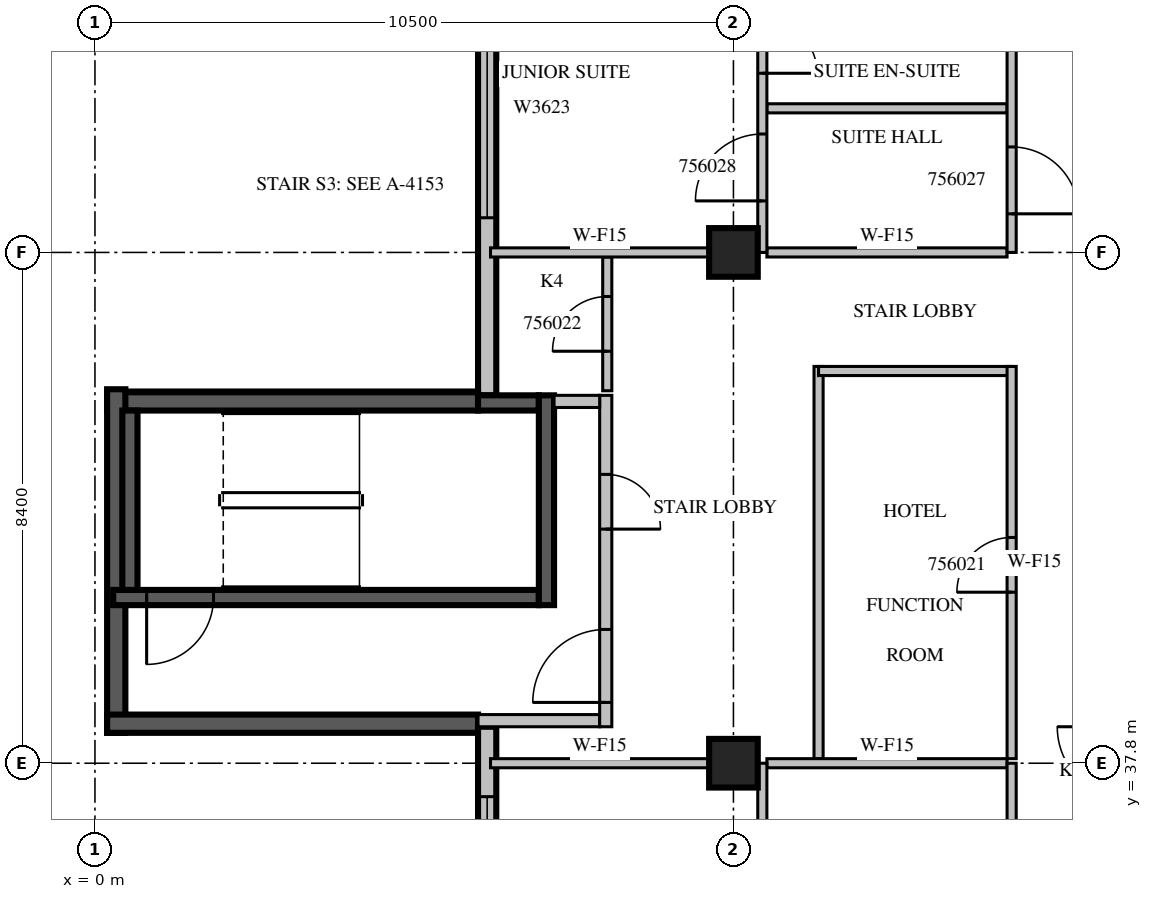
"""IFC4 building model, lengths in metres.
Left out: names, types, materials, properties, quantities, classifications, styles, units other than length and angle.
Written with IfcOpenShell. Run it as: python <this file> out.ifc"""

import sys

from ifc_helpers import new_model, si_unit, direction, frame, frame_2d, origin, origin_2d, place, context, subcontext, project, spatial, rectangle, extrude, source, transform, mapped, element, fill, save


model = new_model("IFC4")
c1 = context("Model", 3, precision=1e-05, world=origin(), true_north=direction((0.0, 1.0)))
c2 = subcontext(c1, "Body", "Model", "MODEL_VIEW")
j1 = project(units=[si_unit("LENGTHUNIT", "METRE"), si_unit("PLANEANGLEUNIT", "RADIAN")], contexts=[c1])
p1 = place(None, origin())
s1 = spatial("IfcSite", under=j1, at=p1, CompositionType="ELEMENT")
p2 = place(p1, origin())
s2 = spatial("IfcBuilding", under=s1, at=p2, CompositionType="ELEMENT")
p3 = place(p2, frame((0.0, 0.0, 246.2)))
s3 = spatial("IfcBuildingStorey", under=s2, at=p3, CompositionType="ELEMENT", Elevation=246.2)
m1 = source(origin(), c2, "Body", "SweptSolid", [
    extrude(rectangle(XDim=0.8, YDim=0.8, at=origin_2d()), origin(), (0.0, 0.0, 1.0), 3.8),
])
for number, where, z_axis, x_axis in (
    (1, (10.5, 37.8, 0.0), (0.0, 0.0, 1.0), (1.0, 0.0, 0.0)),
    (2, (10.5, 46.2, 0.0), (0.0, 0.0, 1.0), (1.0, 0.0, 0.0)),
):
    element("IfcColumn", number, at=place(p3, frame(where, z_axis=z_axis, x_axis=x_axis)), inside=s3, PredefinedType="COLUMN", context=c2, shape_type="MappedRepresentation", body=[
        mapped(m1, transform((0.0, 0.0, 0.0), scale=1.0)),
    ])
m2 = source(origin(), c2, "Body", "SweptSolid", [
    extrude(rectangle(XDim=9.91, YDim=0.3, at=frame_2d((4.955, 0.0))), origin(), (0.0, 0.0, 1.0), 3.4),
])
p4 = place(p3, frame((6.45, 53.76, 0.0), z_axis=(0.0, 0.0, 1.0), x_axis=(0.0, -1.0, 0.0)))
e3 = element("IfcWall", 3, at=p4, inside=s3, PredefinedType="STANDARD", context=c2, shape_type="MappedRepresentation", body=[
    mapped(m2, transform((0.0, 0.0, 0.0), scale=1.0)),
])
m3 = source(origin(), c2, "Body", "SweptSolid", [
    extrude(rectangle(XDim=3.6, YDim=2.3, at=frame_2d((1.8, 1.15))), frame((0.0, 0.16, 0.0), z_axis=(0.0, -1.0, 0.0), x_axis=(1.0, 0.0, 0.0)), (0.0, 0.0, 1.0), 0.32),
])
p5 = place(p4, frame((3.39, 0.0, 0.6)))
e4 = element("IfcOpeningElement", 4, at=p5, cuts=e3, PredefinedType="OPENING", context=c2, shape_type="MappedRepresentation", body=[
    mapped(m3, transform((0.0, 0.0, 0.0), scale=1.0)),
])
m4 = source(origin(), c2, "Body", "SweptSolid", [
    extrude(rectangle(XDim=2.4, YDim=2.3, at=frame_2d((1.2, 1.15))), frame((0.0, 0.16, 0.0), z_axis=(0.0, -1.0, 0.0), x_axis=(1.0, 0.0, 0.0)), (0.0, 0.0, 1.0), 0.32),
])
p6 = place(p4, frame((0.495, 0.0, 0.6)))
e5 = element("IfcOpeningElement", 5, at=p6, cuts=e3, PredefinedType="OPENING", context=c2, shape_type="MappedRepresentation", body=[
    mapped(m4, transform((0.0, 0.0, 0.0), scale=1.0)),
])
m5 = source(origin(), c2, "Body", "SweptSolid", [
    extrude(rectangle(XDim=6.1, YDim=0.3, at=frame_2d((3.05, 0.0))), origin(), (0.0, 0.0, 1.0), 3.4),
])
p7 = place(p3, frame((6.3, 43.75, 0.0), z_axis=(0.0, 0.0, 1.0), x_axis=(-1.0, 0.0, 0.0)))
e6 = element("IfcWall", 6, at=p7, inside=s3, PredefinedType="SOLIDWALL", context=c2, shape_type="MappedRepresentation", body=[
    mapped(m5, transform((0.0, 0.0, 0.0), scale=1.0)),
])
m6 = source(origin(), c2, "Body", "SweptSolid", [
    extrude(rectangle(XDim=5.65, YDim=0.3, at=frame_2d((2.825, 0.0))), origin(), (0.0, 0.0, 1.0), 3.4),
])
p8 = place(p3, frame((0.35, 43.95, 0.0), z_axis=(0.0, 0.0, 1.0), x_axis=(0.0, -1.0, 0.0)))
e7 = element("IfcWall", 7, at=p8, inside=s3, PredefinedType="SOLIDWALL", context=c2, shape_type="MappedRepresentation", body=[
    mapped(m6, transform((0.0, 0.0, 0.0), scale=1.0)),
])
p9 = place(p3, frame((0.2, 38.45, 0.0), z_axis=(0.0, 0.0, 1.0), x_axis=(1.0, 0.0, 0.0)))
e8 = element("IfcWall", 8, at=p9, inside=s3, PredefinedType="SOLIDWALL", context=c2, shape_type="MappedRepresentation", body=[
    mapped(m5, transform((0.0, 0.0, 0.0), scale=1.0)),
])
m7 = source(origin(), c2, "Body", "SweptSolid", [
    extrude(rectangle(XDim=16.6, YDim=0.3, at=frame_2d((8.3, 0.0))), origin(), (0.0, 0.0, 1.0), 3.4),
])
p10 = place(p3, frame((6.45, 38.4, 0.0), z_axis=(0.0, 0.0, 1.0), x_axis=(0.0, -1.0, 0.0)))
e9 = element("IfcWall", 9, at=p10, inside=s3, PredefinedType="STANDARD", context=c2, shape_type="MappedRepresentation", body=[
    mapped(m7, transform((0.0, 0.0, 0.0), scale=1.0)),
])
m8 = source(origin(), c2, "Body", "SweptSolid", [
    extrude(rectangle(XDim=1.8, YDim=2.3, at=frame_2d((0.9, 1.15))), frame((0.0, 0.16, 0.0), z_axis=(0.0, -1.0, 0.0), x_axis=(1.0, 0.0, 0.0)), (0.0, 0.0, 1.0), 0.32),
])
p11 = place(p10, frame((1.15, 0.0, 0.6)))
e10 = element("IfcOpeningElement", 10, at=p11, cuts=e9, PredefinedType="OPENING", context=c2, shape_type="MappedRepresentation", body=[
    mapped(m8, transform((0.0, 0.0, 0.0), scale=1.0)),
])
p12 = place(p10, frame((9.438, 0.0, 0.6)))
e11 = element("IfcOpeningElement", 11, at=p12, cuts=e9, PredefinedType="OPENING", context=c2, shape_type="MappedRepresentation", body=[
    mapped(m8, transform((0.0, 0.0, 0.0), scale=1.0)),
])
m9 = source(origin(), c2, "Body", "SweptSolid", [
    extrude(rectangle(XDim=3.0, YDim=2.3, at=frame_2d((1.5, 1.15))), frame((0.0, 0.16, 0.0), z_axis=(0.0, -1.0, 0.0), x_axis=(1.0, 0.0, 0.0)), (0.0, 0.0, 1.0), 0.32),
])
p13 = place(p10, frame((12.7, 0.0, 0.6)))
e12 = element("IfcOpeningElement", 12, at=p13, cuts=e9, PredefinedType="OPENING", context=c2, shape_type="MappedRepresentation", body=[
    mapped(m9, transform((0.0, 0.0, 0.0), scale=1.0)),
])
m10 = source(origin(), c2, "Body", "SweptSolid", [
    extrude(rectangle(XDim=1.0, YDim=2.1, at=frame_2d((0.5, 1.05))), frame((0.0, 0.16, 0.0), z_axis=(0.0, -1.0, 0.0), x_axis=(1.0, 0.0, 0.0)), (0.0, 0.0, 1.0), 0.32),
])
p14 = place(p10, frame((5.45, 0.0, 0.0)))
e13 = element("IfcOpeningElement", 13, at=p14, cuts=e9, PredefinedType="OPENING", context=c2, shape_type="MappedRepresentation", body=[
    mapped(m10, transform((0.0, 0.0, 0.0), scale=1.0)),
])
m11 = source(origin(), c2, "Body", "SweptSolid", [
    extrude(rectangle(XDim=7.0, YDim=0.25, at=frame_2d((3.5, 0.0))), origin(), (0.0, 0.0, 1.0), 3.4),
])
p15 = place(p3, frame((0.3, 40.525, 0.0), z_axis=(0.0, 0.0, 1.0), x_axis=(1.0, 0.0, 0.0)))
e14 = element("IfcWall", 14, at=p15, inside=s3, PredefinedType="SOLIDWALL", context=c2, shape_type="MappedRepresentation", body=[
    mapped(m11, transform((0.0, 0.0, 0.0), scale=1.0)),
])
m12 = source(origin(), c2, "Body", "SweptSolid", [
    extrude(rectangle(XDim=1.1, YDim=2.1, at=frame_2d((0.55, 1.05))), frame((0.0, 0.135, 0.0), z_axis=(0.0, -1.0, 0.0), x_axis=(1.0, 0.0, 0.0)), (0.0, 0.0, 1.0), 0.27),
])
p16 = place(p15, frame((0.55, 0.0, 0.0)))
e15 = element("IfcOpeningElement", 15, at=p16, cuts=e14, PredefinedType="OPENING", context=c2, shape_type="MappedRepresentation", body=[
    mapped(m12, transform((0.0, 0.0, 0.0), scale=1.0)),
])
m13 = source(origin(), c2, "Body", "SweptSolid", [
    extrude(rectangle(XDim=1.0, YDim=0.25, at=frame_2d((0.5, 0.0))), origin(), (0.0, 0.0, 1.0), 3.4),
])
p17 = place(p3, frame((6.3, 43.725, 0.0), z_axis=(0.0, 0.0, 1.0), x_axis=(1.0, 0.0, 0.0)))
e16 = element("IfcWall", 16, at=p17, inside=s3, PredefinedType="SOLIDWALL", context=c2, shape_type="MappedRepresentation", body=[
    mapped(m13, transform((0.0, 0.0, 0.0), scale=1.0)),
])
m14 = source(origin(), c2, "Body", "SweptSolid", [
    extrude(rectangle(XDim=3.45, YDim=0.25, at=frame_2d((1.725, 0.0))), origin(), (0.0, 0.0, 1.0), 3.4),
])
p18 = place(p3, frame((7.425, 40.4, 0.0), z_axis=(0.0, 0.0, 1.0), x_axis=(0.0, 1.0, 0.0)))
e17 = element("IfcWall", 17, at=p18, inside=s3, PredefinedType="SOLIDWALL", context=c2, shape_type="MappedRepresentation", body=[
    mapped(m14, transform((0.0, 0.0, 0.0), scale=1.0)),
])
m15 = source(origin(), c2, "Body", "SweptSolid", [
    extrude(rectangle(XDim=2.95, YDim=0.25, at=frame_2d((1.475, 0.0))), origin(), (0.0, 0.0, 1.0), 3.4),
])
p19 = place(p3, frame((0.575, 40.65, 0.0), z_axis=(0.0, 0.0, 1.0), x_axis=(0.0, 1.0, 0.0)))
e18 = element("IfcWall", 18, at=p19, inside=s3, PredefinedType="SOLIDWALL", context=c2, shape_type="MappedRepresentation", body=[
    mapped(m15, transform((0.0, 0.0, 0.0), scale=1.0)),
])
m16 = source(origin(), c2, "Body", "SweptSolid", [
    extrude(rectangle(XDim=2.0, YDim=0.2, at=frame_2d((1.0, 0.0))), origin(), (0.0, 0.0, 1.0), 3.4),
])
p20 = place(p3, frame((6.3, 38.5, 0.0), z_axis=(0.0, 0.0, 1.0), x_axis=(1.0, 0.0, 0.0)))
e19 = element("IfcWall", 19, at=p20, inside=s3, PredefinedType="PARTITIONING", context=c2, shape_type="MappedRepresentation", body=[
    mapped(m16, transform((0.0, 0.0, 0.0), scale=1.0)),
])
m17 = source(origin(), c2, "Body", "SweptSolid", [
    extrude(rectangle(XDim=5.45, YDim=0.2, at=frame_2d((2.725, 0.0))), origin(), (0.0, 0.0, 1.0), 3.4),
])
p21 = place(p3, frame((8.4, 38.4, 0.0), z_axis=(0.0, 0.0, 1.0), x_axis=(0.0, 1.0, 0.0)))
e20 = element("IfcWall", 20, at=p21, inside=s3, PredefinedType="PARTITIONING", context=c2, shape_type="MappedRepresentation", body=[
    mapped(m17, transform((0.0, 0.0, 0.0), scale=1.0)),
])
m18 = source(origin(), c2, "Body", "SweptSolid", [
    extrude(rectangle(XDim=1.2, YDim=2.1, at=frame_2d((0.6, 1.05))), frame((0.0, 0.11, 0.0), z_axis=(0.0, -1.0, 0.0), x_axis=(1.0, 0.0, 0.0)), (0.0, 0.0, 1.0), 0.22),
])
p22 = place(p21, frame((0.4, 0.0, 0.0)))
e21 = element("IfcOpeningElement", 21, at=p22, cuts=e20, PredefinedType="OPENING", context=c2, shape_type="MappedRepresentation", body=[
    mapped(m18, transform((0.0, 0.0, 0.0), scale=1.0)),
])
m19 = source(origin(), c2, "Body", "SweptSolid", [
    extrude(rectangle(XDim=0.9, YDim=2.1, at=frame_2d((0.45, 1.05))), frame((0.0, 0.11, 0.0), z_axis=(0.0, -1.0, 0.0), x_axis=(1.0, 0.0, 0.0)), (0.0, 0.0, 1.0), 0.22),
])
p23 = place(p21, frame((3.25, 0.0, 0.0)))
e22 = element("IfcOpeningElement", 22, at=p23, cuts=e20, PredefinedType="OPENING", context=c2, shape_type="MappedRepresentation", body=[
    mapped(m19, transform((0.0, 0.0, 0.0), scale=1.0)),
])
m20 = source(origin(), c2, "Body", "SweptSolid", [
    extrude(rectangle(XDim=0.75, YDim=0.2, at=frame_2d((0.375, 0.0))), origin(), (0.0, 0.0, 1.0), 3.4),
])
p24 = place(p3, frame((7.55, 43.75, 0.0), z_axis=(0.0, 0.0, 1.0), x_axis=(1.0, 0.0, 0.0)))
e23 = element("IfcWall", 23, at=p24, inside=s3, PredefinedType="PARTITIONING", context=c2, shape_type="MappedRepresentation", body=[
    mapped(m20, transform((0.0, 0.0, 0.0), scale=1.0)),
])
m21 = source(origin(), c2, "Body", "SweptSolid", [
    extrude(rectangle(XDim=6.45, YDim=0.15, at=frame_2d((3.225, 0.0))), origin(), (0.0, 0.0, 1.0), 3.4),
])
p25 = place(p3, frame((11.9, 44.325, 0.0), z_axis=(0.0, 0.0, 1.0), x_axis=(0.0, -1.0, 0.0)))
e24 = element("IfcWall", 24, at=p25, inside=s3, PredefinedType="PARTITIONING", context=c2, shape_type="MappedRepresentation", body=[
    mapped(m21, transform((0.0, 0.0, 0.0), scale=1.0)),
])
m22 = source(origin(), c2, "Body", "SweptSolid", [
    extrude(rectangle(XDim=3.175, YDim=0.15, at=frame_2d((1.587, 0.0))), origin(), (0.0, 0.0, 1.0), 3.4),
])
p26 = place(p3, frame((15.075, 44.25, 0.0), z_axis=(0.0, 0.0, 1.0), x_axis=(-1.0, 0.0, 0.0)))
e25 = element("IfcWall", 25, at=p26, inside=s3, PredefinedType="PARTITIONING", context=c2, shape_type="MappedRepresentation", body=[
    mapped(m22, transform((0.0, 0.0, 0.0), scale=1.0)),
])
p27 = place(p3, frame((15.075, 37.875, 0.0), z_axis=(0.0, 0.0, 1.0), x_axis=(0.0, 1.0, 0.0)))
e26 = element("IfcWall", 26, at=p27, inside=s3, PredefinedType="PARTITIONING", context=c2, shape_type="MappedRepresentation", body=[
    mapped(m21, transform((0.0, 0.0, 0.0), scale=1.0)),
])
m23 = source(origin(), c2, "Body", "SweptSolid", [
    extrude(rectangle(XDim=0.9, YDim=2.1, at=frame_2d((0.45, 1.05))), frame((0.0, 0.085, 0.0), z_axis=(0.0, -1.0, 0.0), x_axis=(1.0, 0.0, 0.0)), (0.0, 0.0, 1.0), 0.17),
])
p28 = place(p27, frame((2.737, 0.0, 0.0)))
e27 = element("IfcOpeningElement", 27, at=p28, cuts=e26, PredefinedType="OPENING", context=c2, shape_type="MappedRepresentation", body=[
    mapped(m23, transform((0.0, 0.0, 0.0), scale=1.0)),
])
m24 = source(origin(), c2, "Body", "SweptSolid", [
    extrude(rectangle(XDim=2.2, YDim=0.15, at=frame_2d((1.1, 0.0))), origin(), (0.0, 0.0, 1.0), 3.4),
])
p29 = place(p3, frame((8.425, 43.925, 0.0), z_axis=(0.0, 0.0, 1.0), x_axis=(0.0, 1.0, 0.0)))
e28 = element("IfcWall", 28, at=p29, inside=s3, PredefinedType="PARTITIONING", context=c2, shape_type="MappedRepresentation", body=[
    mapped(m24, transform((0.0, 0.0, 0.0), scale=1.0)),
])
p30 = place(p29, frame((0.65, 0.0, 0.0)))
e29 = element("IfcOpeningElement", 29, at=p30, cuts=e28, PredefinedType="OPENING", context=c2, shape_type="MappedRepresentation", body=[
    mapped(m23, transform((0.0, 0.0, 0.0), scale=1.0)),
])
m25 = source(origin(), c2, "Body", "SweptSolid", [
    extrude(rectangle(XDim=3.596, YDim=0.15, at=frame_2d((1.798, 0.0))), origin(), (0.0, 0.0, 1.0), 3.4),
])
p31 = place(p3, frame((10.101, 37.8, 0.0), z_axis=(0.0, 0.0, 1.0), x_axis=(-1.0, 0.0, 0.0)))
e30 = element("IfcWall", 30, at=p31, inside=s3, PredefinedType="PARTITIONING", context=c2, shape_type="MappedRepresentation", body=[
    mapped(m25, transform((0.0, 0.0, 0.0), scale=1.0)),
])
m26 = source(origin(), c2, "Body", "SweptSolid", [
    extrude(rectangle(XDim=3.95, YDim=0.15, at=frame_2d((1.975, 0.0))), origin(), (0.0, 0.0, 1.0), 3.4),
])
p32 = place(p3, frame((15.0, 37.8, 0.0), z_axis=(0.0, 0.0, 1.0), x_axis=(-1.0, 0.0, 0.0)))
e31 = element("IfcWall", 31, at=p32, inside=s3, PredefinedType="PARTITIONING", context=c2, shape_type="MappedRepresentation", body=[
    mapped(m26, transform((0.0, 0.0, 0.0), scale=1.0)),
])
m27 = source(origin(), c2, "Body", "SweptSolid", [
    extrude(rectangle(XDim=8.4, YDim=0.15, at=frame_2d((4.2, 0.0))), origin(), (0.0, 0.0, 1.0), 3.4),
])
p33 = place(p3, frame((10.975, 29.4, 0.0), z_axis=(0.0, 0.0, 1.0), x_axis=(0.0, 1.0, 0.0)))
e32 = element("IfcWall", 32, at=p33, inside=s3, PredefinedType="PARTITIONING", context=c2, shape_type="MappedRepresentation", body=[
    mapped(m27, transform((0.0, 0.0, 0.0), scale=1.0)),
])
p34 = place(p33, frame((0.408, 0.0, 0.0)))
e33 = element("IfcOpeningElement", 33, at=p34, cuts=e32, PredefinedType="OPENING", context=c2, shape_type="MappedRepresentation", body=[
    mapped(m23, transform((0.0, 0.0, 0.0), scale=1.0)),
])
p35 = place(p33, frame((2.328, 0.0, 0.0)))
e34 = element("IfcOpeningElement", 34, at=p35, cuts=e32, PredefinedType="OPENING", context=c2, shape_type="MappedRepresentation", body=[
    mapped(m23, transform((0.0, 0.0, 0.0), scale=1.0)),
])
p36 = place(p3, frame((15.0, 48.57, 0.0), z_axis=(0.0, 0.0, 1.0), x_axis=(-1.0, 0.0, 0.0)))
e35 = element("IfcWall", 35, at=p36, inside=s3, PredefinedType="PARTITIONING", context=c2, shape_type="MappedRepresentation", body=[
    mapped(m26, transform((0.0, 0.0, 0.0), scale=1.0)),
])
p37 = place(p3, frame((10.101, 46.2, 0.0), z_axis=(0.0, 0.0, 1.0), x_axis=(-1.0, 0.0, 0.0)))
e36 = element("IfcWall", 36, at=p37, inside=s3, PredefinedType="PARTITIONING", context=c2, shape_type="MappedRepresentation", body=[
    mapped(m25, transform((0.0, 0.0, 0.0), scale=1.0)),
])
p38 = place(p3, frame((15.0, 46.2, 0.0), z_axis=(0.0, 0.0, 1.0), x_axis=(-1.0, 0.0, 0.0)))
e37 = element("IfcWall", 37, at=p38, inside=s3, PredefinedType="PARTITIONING", context=c2, shape_type="MappedRepresentation", body=[
    mapped(m26, transform((0.0, 0.0, 0.0), scale=1.0)),
])
m28 = source(origin(), c2, "Body", "SweptSolid", [
    extrude(rectangle(XDim=7.26, YDim=0.15, at=frame_2d((3.63, 0.0))), origin(), (0.0, 0.0, 1.0), 3.4),
])
p39 = place(p3, frame((10.975, 46.2, 0.0), z_axis=(0.0, 0.0, 1.0), x_axis=(0.0, 1.0, 0.0)))
e38 = element("IfcWall", 38, at=p39, inside=s3, PredefinedType="PARTITIONING", context=c2, shape_type="MappedRepresentation", body=[
    mapped(m28, transform((0.0, 0.0, 0.0), scale=1.0)),
])
m29 = source(origin(), c2, "Body", "SweptSolid", [
    extrude(rectangle(XDim=1.1, YDim=2.1, at=frame_2d((0.55, 1.05))), frame((0.0, 0.085, 0.0), z_axis=(0.0, -1.0, 0.0), x_axis=(1.0, 0.0, 0.0)), (0.0, 0.0, 1.0), 0.17),
])
p40 = place(p39, frame((0.847, 0.0, 0.0)))
e39 = element("IfcOpeningElement", 39, at=p40, cuts=e38, PredefinedType="OPENING", context=c2, shape_type="MappedRepresentation", body=[
    mapped(m29, transform((0.0, 0.0, 0.0), scale=1.0)),
])
p41 = place(p39, frame((2.946, 0.0, 0.0)))
e40 = element("IfcOpeningElement", 40, at=p41, cuts=e38, PredefinedType="OPENING", context=c2, shape_type="MappedRepresentation", body=[
    mapped(m23, transform((0.0, 0.0, 0.0), scale=1.0)),
])
p42 = place(p39, frame((4.529, 0.0, 0.0)))
e41 = element("IfcOpeningElement", 41, at=p42, cuts=e38, PredefinedType="OPENING", context=c2, shape_type="MappedRepresentation", body=[
    mapped(m23, transform((0.0, 0.0, 0.0), scale=1.0)),
])
p43 = place(p3, frame((15.075, 29.4, 0.0), z_axis=(0.0, 0.0, 1.0), x_axis=(0.0, 1.0, 0.0)))
e42 = element("IfcWall", 42, at=p43, inside=s3, PredefinedType="PARTITIONING", context=c2, shape_type="MappedRepresentation", body=[
    mapped(m27, transform((0.0, 0.0, 0.0), scale=1.0)),
])
m30 = source(origin(), c2, "Body", "SweptSolid", [
    extrude(rectangle(XDim=1.0, YDim=2.1, at=frame_2d((0.5, 1.05))), frame((0.0, 0.085, 0.0), z_axis=(0.0, -1.0, 0.0), x_axis=(1.0, 0.0, 0.0)), (0.0, 0.0, 1.0), 0.17),
])
p44 = place(p43, frame((0.245, 0.0, 0.0)))
e43 = element("IfcOpeningElement", 43, at=p44, cuts=e42, PredefinedType="OPENING", context=c2, shape_type="MappedRepresentation", body=[
    mapped(m30, transform((0.0, 0.0, 0.0), scale=1.0)),
])
p45 = place(p43, frame((5.733, 0.0, 0.0)))
e44 = element("IfcOpeningElement", 44, at=p45, cuts=e42, PredefinedType="OPENING", context=c2, shape_type="MappedRepresentation", body=[
    mapped(m23, transform((0.0, 0.0, 0.0), scale=1.0)),
])
p46 = place(p3, frame((15.075, 46.2, 0.0), z_axis=(0.0, 0.0, 1.0), x_axis=(0.0, 1.0, 0.0)))
e45 = element("IfcWall", 45, at=p46, inside=s3, PredefinedType="PARTITIONING", context=c2, shape_type="MappedRepresentation", body=[
    mapped(m28, transform((0.0, 0.0, 0.0), scale=1.0)),
])
p47 = place(p46, frame((0.635, 0.0, 0.0)))
e46 = element("IfcOpeningElement", 46, at=p47, cuts=e45, PredefinedType="OPENING", context=c2, shape_type="MappedRepresentation", body=[
    mapped(m29, transform((0.0, 0.0, 0.0), scale=1.0)),
])
m31 = source(origin(), c2, "Body", "SweptSolid", [
    extrude(rectangle(XDim=3.6, YDim=2.3, at=frame_2d((1.8, 1.15))), frame((0.0, 0.03, 0.0), z_axis=(0.0, -1.0, 0.0), x_axis=(1.0, 0.0, 0.0)), (0.0, 0.0, 1.0), 0.06),
])
p48 = place(p5, origin())
e47 = element("IfcWindow", 47, at=p48, inside=s3, PartitioningType="SINGLE_PANEL", PredefinedType="WINDOW", context=c2, shape_type="MappedRepresentation", body=[
    mapped(m31, transform((0.0, 0.0, 0.0), scale=1.0)),
])
fill(e4, e47)
m32 = source(origin(), c2, "Body", "SweptSolid", [
    extrude(rectangle(XDim=1.8, YDim=2.3, at=frame_2d((0.9, 1.15))), frame((0.0, 0.03, 0.0), z_axis=(0.0, -1.0, 0.0), x_axis=(1.0, 0.0, 0.0)), (0.0, 0.0, 1.0), 0.06),
])
p49 = place(p11, origin())
e48 = element("IfcWindow", 48, at=p49, inside=s3, PartitioningType="SINGLE_PANEL", PredefinedType="WINDOW", context=c2, shape_type="MappedRepresentation", body=[
    mapped(m32, transform((0.0, 0.0, 0.0), scale=1.0)),
])
fill(e10, e48)
m33 = source(origin(), c2, "Body", "SweptSolid", [
    extrude(rectangle(XDim=1.1, YDim=2.1, at=frame_2d((0.55, 1.05))), frame((0.0, 0.025, 0.0), z_axis=(0.0, -1.0, 0.0), x_axis=(1.0, 0.0, 0.0)), (0.0, 0.0, 1.0), 0.05),
])
p50 = place(p16, origin())
e49 = element("IfcDoor", 49, at=p50, inside=s3, OperationType="SINGLE_SWING_RIGHT", PredefinedType="DOOR", context=c2, shape_type="MappedRepresentation", body=[
    mapped(m33, transform((0.0, 0.0, 0.0), scale=1.0)),
])
fill(e15, e49)
m34 = source(origin(), c2, "Body", "SweptSolid", [
    extrude(rectangle(XDim=1.2, YDim=2.1, at=frame_2d((0.6, 1.05))), frame((0.0, 0.025, 0.0), z_axis=(0.0, -1.0, 0.0), x_axis=(1.0, 0.0, 0.0)), (0.0, 0.0, 1.0), 0.05),
])
p51 = place(p22, origin())
e50 = element("IfcDoor", 50, at=p51, inside=s3, OperationType="SINGLE_SWING_LEFT", PredefinedType="DOOR", context=c2, shape_type="MappedRepresentation", body=[
    mapped(m34, transform((0.0, 0.0, 0.0), scale=1.0)),
])
fill(e21, e50)
m35 = source(origin(), c2, "Body", "SweptSolid", [
    extrude(rectangle(XDim=0.9, YDim=2.1, at=frame_2d((0.45, 1.05))), frame((0.0, 0.025, 0.0), z_axis=(0.0, -1.0, 0.0), x_axis=(1.0, 0.0, 0.0)), (0.0, 0.0, 1.0), 0.05),
])
p52 = place(p23, origin())
e51 = element("IfcDoor", 51, at=p52, inside=s3, OperationType="SINGLE_SWING_RIGHT", PredefinedType="DOOR", context=c2, shape_type="MappedRepresentation", body=[
    mapped(m35, transform((0.0, 0.0, 0.0), scale=1.0)),
])
fill(e22, e51)
p53 = place(p28, origin())
e52 = element("IfcDoor", 52, at=p53, inside=s3, OperationType="SINGLE_SWING_LEFT", PredefinedType="DOOR", context=c2, shape_type="MappedRepresentation", body=[
    mapped(m35, transform((0.0, 0.0, 0.0), scale=1.0)),
])
fill(e27, e52)
p54 = place(p30, origin())
e53 = element("IfcDoor", 53, at=p54, inside=s3, OperationType="SINGLE_SWING_LEFT", PredefinedType="DOOR", context=c2, shape_type="MappedRepresentation", body=[
    mapped(m35, transform((0.0, 0.0, 0.0), scale=1.0)),
])
fill(e29, e53)
p55 = place(p47, origin())
e54 = element("IfcDoor", 54, at=p55, inside=s3, OperationType="SINGLE_SWING_RIGHT", PredefinedType="DOOR", context=c2, shape_type="MappedRepresentation", body=[
    mapped(m33, transform((0.0, 0.0, 0.0), scale=1.0)),
])
fill(e46, e54)
p56 = place(p40, origin())
e55 = element("IfcDoor", 55, at=p56, inside=s3, OperationType="SINGLE_SWING_LEFT", PredefinedType="DOOR", context=c2, shape_type="MappedRepresentation", body=[
    mapped(m33, transform((0.0, 0.0, 0.0), scale=1.0)),
])
fill(e39, e55)
p57 = place(p41, origin())
e56 = element("IfcDoor", 56, at=p57, inside=s3, OperationType="SINGLE_SWING_RIGHT", PredefinedType="DOOR", context=c2, shape_type="MappedRepresentation", body=[
    mapped(m35, transform((0.0, 0.0, 0.0), scale=1.0)),
])
fill(e40, e56)
save(model, sys.argv[1])
